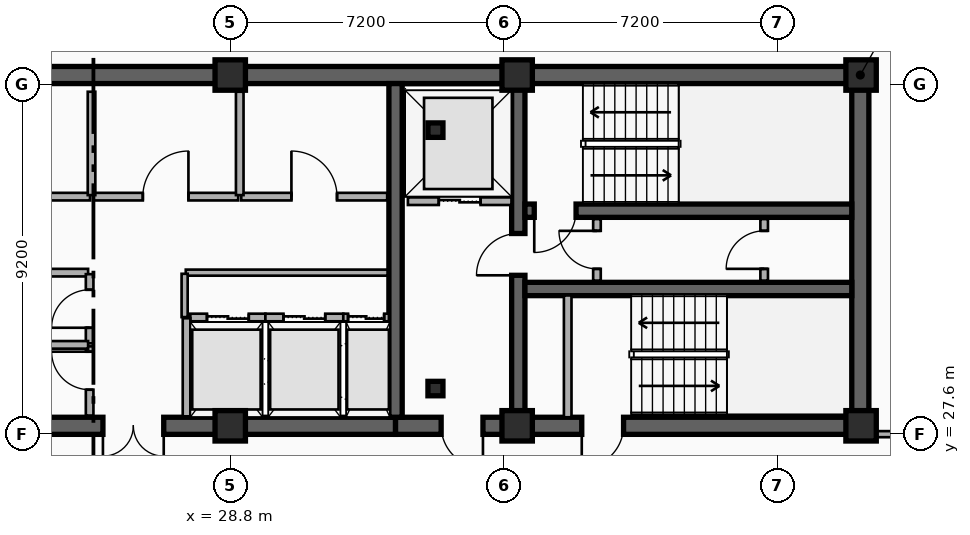
"""IFC4 building model, lengths in metres.
Left out: names, types, materials, properties, quantities, classifications, styles, units other than length and angle.
Written with IfcOpenShell. Run it as: python <this file> out.ifc"""

import sys

from ifc_helpers import new_model, si_unit, direction, frame, frame_2d, origin, origin_2d, place, context, subcontext, project, spatial, rectangle, i_section, extrude, element, fill, save


model = new_model("IFC4")
c1 = context("Model", 3, precision=1e-05, world=origin(), true_north=direction((0.0, 1.0)))
c2 = subcontext(c1, "Body", "Model", "MODEL_VIEW")
j1 = project(units=[si_unit("LENGTHUNIT", "METRE"), si_unit("PLANEANGLEUNIT", "RADIAN")], contexts=[c1])
p1 = place(None, origin())
s1 = spatial("IfcSite", under=j1, at=p1, CompositionType="ELEMENT")
p2 = place(p1, origin())
s2 = spatial("IfcBuilding", under=s1, at=p2, CompositionType="ELEMENT")
p3 = place(p2, frame((0.0, 0.0, 254.7)))
s3 = spatial("IfcBuildingStorey", under=s2, at=p3, CompositionType="ELEMENT", Elevation=254.7)
p4 = place(p3, frame((12.15, 37.05, 0.0), z_axis=(0.0, 0.0, 1.0), x_axis=(1.0, 0.0, 0.0)))
e1 = element("IfcWall", 1, at=p4, inside=s3, PredefinedType="SHEAR", context=c2, shape_type="SweptSolid", body=[
    extrude(rectangle(XDim=33.23, YDim=0.45, at=frame_2d((16.615, 0.0))), origin(), (0.0, 0.0, 1.0), 3.7),
])
p5 = place(p3, frame((33.15, 27.82, 0.0), z_axis=(0.0, 0.0, 1.0), x_axis=(-1.0, 0.0, 0.0)))
e2 = element("IfcWall", 2, at=p5, inside=s3, PredefinedType="SHEAR", context=c2, shape_type="SweptSolid", body=[
    extrude(rectangle(XDim=11.97, YDim=0.45, at=frame_2d((5.985, 0.0))), origin(), (0.0, 0.0, 1.0), 3.7),
])
p6 = place(p5, frame((6.1, 0.0, 0.0)))
e3 = element("IfcOpeningElement", 3, at=p6, cuts=e2, PredefinedType="OPENING", context=c2, shape_type="SweptSolid", body=[
    extrude(rectangle(XDim=1.6, YDim=2.2, at=frame_2d((0.8, 1.1))), frame((0.0, 0.235, 0.0), z_axis=(0.0, -1.0, 0.0), x_axis=(1.0, 0.0, 0.0)), (0.0, 0.0, 1.0), 0.47),
])
p7 = place(p3, frame((45.38, 27.82, 0.0), z_axis=(0.0, 0.0, 1.0), x_axis=(-1.0, 0.0, 0.0)))
e4 = element("IfcWall", 4, at=p7, inside=s3, PredefinedType="SHEAR", context=c2, shape_type="SweptSolid", body=[
    extrude(rectangle(XDim=12.23, YDim=0.45, at=frame_2d((6.115, 0.0))), origin(), (0.0, 0.0, 1.0), 3.7),
])
p8 = place(p7, frame((9.93, 0.0, 0.0)))
e5 = element("IfcOpeningElement", 5, at=p8, cuts=e4, PredefinedType="OPENING", context=c2, shape_type="SweptSolid", body=[
    extrude(rectangle(XDim=1.1, YDim=2.15, at=frame_2d((0.55, 1.075))), frame((0.0, 0.235, 0.0), z_axis=(0.0, -1.0, 0.0), x_axis=(1.0, 0.0, 0.0)), (0.0, 0.0, 1.0), 0.47),
])
p9 = place(p7, frame((6.23, 0.0, 0.0)))
e6 = element("IfcOpeningElement", 6, at=p9, cuts=e4, PredefinedType="OPENING", context=c2, shape_type="SweptSolid", body=[
    extrude(rectangle(XDim=1.1, YDim=2.15, at=frame_2d((0.55, 1.075))), frame((0.0, 0.235, 0.0), z_axis=(0.0, -1.0, 0.0), x_axis=(1.0, 0.0, 0.0)), (0.0, 0.0, 1.0), 0.47),
])
p10 = place(p3, frame((45.38, 28.045, 0.0), z_axis=(0.0, 0.0, 1.0), x_axis=(0.0, 1.0, 0.0)))
e7 = element("IfcWall", 7, at=p10, inside=s3, PredefinedType="SHEAR", context=c2, shape_type="SweptSolid", body=[
    extrude(rectangle(XDim=8.78, YDim=0.45, at=frame_2d((4.39, 0.0))), origin(), (0.0, 0.0, 1.0), 3.7),
])
p11 = place(p3, frame((33.15, 28.045, 0.0), z_axis=(0.0, 0.0, 1.0), x_axis=(0.0, 1.0, 0.0)))
e8 = element("IfcWall", 8, at=p11, inside=s3, PredefinedType="SHEAR", context=c2, shape_type="SweptSolid", body=[
    extrude(rectangle(XDim=8.78, YDim=0.35, at=frame_2d((4.39, 0.0))), origin(), (0.0, 0.0, 1.0), 3.7),
])
p12 = place(p3, frame((36.38, 28.045, 0.0), z_axis=(0.0, 0.0, 1.0), x_axis=(0.0, 1.0, 0.0)))
e9 = element("IfcWall", 9, at=p12, inside=s3, PredefinedType="SHEAR", context=c2, shape_type="SweptSolid", body=[
    extrude(rectangle(XDim=8.78, YDim=0.35, at=frame_2d((4.39, 0.0))), origin(), (0.0, 0.0, 1.0), 3.7),
])
p13 = place(p12, frame((3.735, 0.0, 0.0)))
e10 = element("IfcOpeningElement", 10, at=p13, cuts=e9, PredefinedType="OPENING", context=c2, shape_type="SweptSolid", body=[
    extrude(rectangle(XDim=1.1, YDim=2.15, at=frame_2d((0.55, 1.075))), frame((0.0, 0.185, 0.0), z_axis=(0.0, -1.0, 0.0), x_axis=(1.0, 0.0, 0.0)), (0.0, 0.0, 1.0), 0.37),
])
p14 = place(p3, frame((45.155, 33.48, 0.0), z_axis=(0.0, 0.0, 1.0), x_axis=(-1.0, 0.0, 0.0)))
e11 = element("IfcWall", 11, at=p14, inside=s3, PredefinedType="SHEAR", context=c2, shape_type="SweptSolid", body=[
    extrude(rectangle(XDim=8.6, YDim=0.35, at=frame_2d((4.3, 0.0))), origin(), (0.0, 0.0, 1.0), 3.7),
])
p15 = place(p14, frame((7.255, 0.0, 0.0)))
e12 = element("IfcOpeningElement", 12, at=p15, cuts=e11, PredefinedType="OPENING", context=c2, shape_type="SweptSolid", body=[
    extrude(rectangle(XDim=1.1, YDim=2.15, at=frame_2d((0.55, 1.075))), frame((0.0, 0.185, 0.0), z_axis=(0.0, -1.0, 0.0), x_axis=(1.0, 0.0, 0.0)), (0.0, 0.0, 1.0), 0.37),
])
p16 = place(p3, frame((36.555, 31.42, 0.0), z_axis=(0.0, 0.0, 1.0), x_axis=(1.0, 0.0, 0.0)))
e13 = element("IfcWall", 13, at=p16, inside=s3, PredefinedType="SHEAR", context=c2, shape_type="SweptSolid", body=[
    extrude(rectangle(XDim=8.6, YDim=0.35, at=frame_2d((4.3, 0.0))), origin(), (0.0, 0.0, 1.0), 3.7),
])
for number, where, z_axis, x_axis in (
    (14, (34.2, 28.8, 0.0), (0.0, 0.0, 1.0), (1.0, 0.0, 0.0)),
    (15, (34.2, 35.6, 0.0), (0.0, 0.0, 1.0), (1.0, 0.0, 0.0)),
):
    element("IfcColumn", number, at=place(p3, frame(where, z_axis=z_axis, x_axis=x_axis)), inside=s3, PredefinedType="COLUMN", context=c2, shape_type="SweptSolid", body=[
        extrude(i_section(OverallWidth=0.395, OverallDepth=0.38, WebThickness=0.019, FlangeThickness=0.03, FilletRadius=0.015, at=origin_2d()), origin(), (0.0, 0.0, 1.0), 3.7),
    ])
for number, where, z_axis, x_axis in (
    (16, (28.8, 27.82, 0.0), (0.0, 0.0, 1.0), (1.0, 0.0, 0.0)),
    (17, (28.8, 37.05, 0.0), (0.0, 0.0, 1.0), (1.0, 0.0, 0.0)),
    (18, (36.35, 27.82, 0.0), (0.0, 0.0, 1.0), (1.0, 0.0, 0.0)),
    (19, (36.35, 37.05, 0.0), (0.0, 0.0, 1.0), (1.0, 0.0, 0.0)),
    (20, (45.4, 27.82, 0.0), (0.0, 0.0, 1.0), (1.0, 0.0, 0.0)),
    (21, (45.4, 37.05, 0.0), (0.0, 0.0, 1.0), (1.0, 0.0, 0.0)),
):
    element("IfcColumn", number, at=place(p3, frame(where, z_axis=z_axis, x_axis=x_axis)), inside=s3, PredefinedType="COLUMN", context=c2, shape_type="SweptSolid", body=[
        extrude(rectangle(XDim=0.8, YDim=0.8, at=origin_2d()), origin(), (0.0, 0.0, 1.0), 3.7),
    ])
p17 = place(p3, frame((33.475, 33.73, 0.0), z_axis=(0.0, 0.0, 1.0), x_axis=(1.0, 0.0, 0.0)))
e22 = element("IfcWall", 22, at=p17, inside=s3, PredefinedType="PARTITIONING", context=c2, shape_type="SweptSolid", body=[
    extrude(rectangle(XDim=2.725, YDim=0.2, at=frame_2d((1.362, 0.0))), origin(), (0.0, 0.0, 1.0), 2.49),
])
p18 = place(p17, frame((0.812, 0.0, 0.0)))
e23 = element("IfcOpeningElement", 23, at=p18, cuts=e22, PredefinedType="OPENING", context=c2, shape_type="SweptSolid", body=[
    extrude(rectangle(XDim=1.1, YDim=2.15, at=frame_2d((0.55, 1.075))), frame((0.0, 0.11, 0.0), z_axis=(0.0, -1.0, 0.0), x_axis=(1.0, 0.0, 0.0)), (0.0, 0.0, 1.0), 0.22),
])
p19 = place(p3, frame((27.75, 30.67, 0.0), z_axis=(0.0, 0.0, 1.0), x_axis=(1.0, 0.0, 0.0)))
e24 = element("IfcWall", 24, at=p19, inside=s3, PredefinedType="PARTITIONING", context=c2, shape_type="SweptSolid", body=[
    extrude(rectangle(XDim=1.975, YDim=0.2, at=frame_2d((0.988, 0.0))), origin(), (0.0, 0.0, 1.0), 2.49),
])
p20 = place(p19, frame((0.438, 0.0, 0.0)))
e25 = element("IfcOpeningElement", 25, at=p20, cuts=e24, PredefinedType="OPENING", context=c2, shape_type="SweptSolid", body=[
    extrude(rectangle(XDim=1.1, YDim=2.15, at=frame_2d((0.55, 1.075))), frame((0.0, 0.11, 0.0), z_axis=(0.0, -1.0, 0.0), x_axis=(1.0, 0.0, 0.0)), (0.0, 0.0, 1.0), 0.22),
])
p21 = place(p3, frame((27.65, 28.07, 0.0), z_axis=(0.0, 0.0, 1.0), x_axis=(0.0, 1.0, 0.0)))
e26 = element("IfcWall", 26, at=p21, inside=s3, PredefinedType="PARTITIONING", context=c2, shape_type="SweptSolid", body=[
    extrude(rectangle(XDim=2.58, YDim=0.2, at=frame_2d((1.29, 0.0))), origin(), (0.0, 0.0, 1.0), 2.49),
])
p22 = place(p3, frame((29.725, 30.67, 0.0), z_axis=(0.0, 0.0, 1.0), x_axis=(1.0, 0.0, 0.0)))
e27 = element("IfcWall", 27, at=p22, inside=s3, PredefinedType="PARTITIONING", context=c2, shape_type="SweptSolid", body=[
    extrude(rectangle(XDim=2.05, YDim=0.2, at=frame_2d((1.025, 0.0))), origin(), (0.0, 0.0, 1.0), 2.8),
])
p23 = place(p22, frame((0.475, 0.0, 0.0)))
e28 = element("IfcOpeningElement", 28, at=p23, cuts=e27, PredefinedType="OPENING", context=c2, shape_type="SweptSolid", body=[
    extrude(rectangle(XDim=1.1, YDim=2.15, at=frame_2d((0.55, 1.075))), frame((0.0, 0.11, 0.0), z_axis=(0.0, -1.0, 0.0), x_axis=(1.0, 0.0, 0.0)), (0.0, 0.0, 1.0), 0.22),
])
p24 = place(p3, frame((31.775, 30.67, 0.0), z_axis=(0.0, 0.0, 1.0), x_axis=(1.0, 0.0, 0.0)))
e29 = element("IfcWall", 29, at=p24, inside=s3, PredefinedType="PARTITIONING", context=c2, shape_type="SweptSolid", body=[
    extrude(rectangle(XDim=1.2, YDim=0.2, at=frame_2d((0.6, 0.0))), origin(), (0.0, 0.0, 1.0), 2.8),
])
p25 = place(p24, frame((0.125, 0.0, 0.0)))
e30 = element("IfcOpeningElement", 30, at=p25, cuts=e29, PredefinedType="OPENING", context=c2, shape_type="SweptSolid", body=[
    extrude(rectangle(XDim=0.95, YDim=2.15, at=frame_2d((0.475, 1.075))), frame((0.0, 0.11, 0.0), z_axis=(0.0, -1.0, 0.0), x_axis=(1.0, 0.0, 0.0)), (0.0, 0.0, 1.0), 0.22),
])
p26 = place(p3, frame((37.68, 28.045, 0.0), z_axis=(0.0, 0.0, 1.0), x_axis=(0.0, 1.0, 0.0)))
e31 = element("IfcWall", 31, at=p26, inside=s3, PredefinedType="PARTITIONING", context=c2, shape_type="SweptSolid", body=[
    extrude(rectangle(XDim=3.205, YDim=0.2, at=frame_2d((1.603, 0.0))), origin(), (0.0, 0.0, 1.0), 2.8),
])
p27 = place(p3, frame((38.45, 31.64, 0.0), z_axis=(0.0, 0.0, 1.0), x_axis=(0.0, 1.0, 0.0)))
e32 = element("IfcWall", 32, at=p27, inside=s3, PredefinedType="PARTITIONING", context=c2, shape_type="SweptSolid", body=[
    extrude(rectangle(XDim=1.62, YDim=0.2, at=frame_2d((0.81, 0.0))), origin(), (0.0, 0.0, 1.0), 3.42),
])
p28 = place(p27, frame((0.31, 0.0, 0.0)))
e33 = element("IfcOpeningElement", 33, at=p28, cuts=e32, PredefinedType="OPENING", context=c2, shape_type="SweptSolid", body=[
    extrude(rectangle(XDim=1.0, YDim=2.15, at=frame_2d((0.5, 1.075))), frame((0.0, 0.11, 0.0), z_axis=(0.0, -1.0, 0.0), x_axis=(1.0, 0.0, 0.0)), (0.0, 0.0, 1.0), 0.22),
])
p29 = place(p3, frame((42.85, 31.64, 0.0), z_axis=(0.0, 0.0, 1.0), x_axis=(0.0, 1.0, 0.0)))
e34 = element("IfcWall", 34, at=p29, inside=s3, PredefinedType="PARTITIONING", context=c2, shape_type="SweptSolid", body=[
    extrude(rectangle(XDim=1.62, YDim=0.2, at=frame_2d((0.81, 0.0))), origin(), (0.0, 0.0, 1.0), 3.42),
])
p30 = place(p29, frame((0.31, 0.0, 0.0)))
e35 = element("IfcOpeningElement", 35, at=p30, cuts=e34, PredefinedType="OPENING", context=c2, shape_type="SweptSolid", body=[
    extrude(rectangle(XDim=1.0, YDim=2.15, at=frame_2d((0.5, 1.075))), frame((0.0, 0.11, 0.0), z_axis=(0.0, -1.0, 0.0), x_axis=(1.0, 0.0, 0.0)), (0.0, 0.0, 1.0), 0.22),
])
p31 = place(p3, frame((21.4, 31.85, 0.0), z_axis=(0.0, 0.0, 1.0), x_axis=(1.0, 0.0, 0.0)))
e36 = element("IfcWall", 36, at=p31, inside=s3, PredefinedType="PARTITIONING", context=c2, shape_type="SweptSolid", body=[
    extrude(rectangle(XDim=3.66, YDim=0.2, at=frame_2d((1.83, 0.0))), origin(), (0.0, 0.0, 1.0), 2.49),
])
p32 = place(p31, frame((1.23, 0.0, 0.0)))
e37 = element("IfcOpeningElement", 37, at=p32, cuts=e36, PredefinedType="OPENING", context=c2, shape_type="SweptSolid", body=[
    extrude(rectangle(XDim=1.2, YDim=2.15, at=frame_2d((0.6, 1.075))), frame((0.0, 0.11, 0.0), z_axis=(0.0, -1.0, 0.0), x_axis=(1.0, 0.0, 0.0)), (0.0, 0.0, 1.0), 0.22),
])
p33 = place(p3, frame((21.59, 33.85, 0.0), z_axis=(0.0, 0.0, 1.0), x_axis=(1.0, 0.0, 0.0)))
e38 = element("IfcWall", 38, at=p33, inside=s3, PredefinedType="PARTITIONING", context=c2, shape_type="SweptSolid", body=[
    extrude(rectangle(XDim=3.52, YDim=0.2, at=frame_2d((1.76, 0.0))), origin(), (0.0, 0.0, 1.0), 2.49),
])
p34 = place(p33, frame((0.225, 0.0, 0.0)))
e39 = element("IfcOpeningElement", 39, at=p34, cuts=e38, PredefinedType="OPENING", context=c2, shape_type="SweptSolid", body=[
    extrude(rectangle(XDim=1.2, YDim=2.15, at=frame_2d((0.6, 1.075))), frame((0.0, 0.11, 0.0), z_axis=(0.0, -1.0, 0.0), x_axis=(1.0, 0.0, 0.0)), (0.0, 0.0, 1.0), 0.22),
])
p35 = place(p3, frame((25.19, 33.85, 0.0), z_axis=(0.0, 0.0, 1.0), x_axis=(1.0, 0.0, 0.0)))
e40 = element("IfcWall", 40, at=p35, inside=s3, PredefinedType="PARTITIONING", context=c2, shape_type="SweptSolid", body=[
    extrude(rectangle(XDim=3.82, YDim=0.2, at=frame_2d((1.91, 0.0))), origin(), (0.0, 0.0, 1.0), 2.49),
])
p36 = place(p35, frame((1.31, 0.0, 0.0)))
e41 = element("IfcOpeningElement", 41, at=p36, cuts=e40, PredefinedType="OPENING", context=c2, shape_type="SweptSolid", body=[
    extrude(rectangle(XDim=1.2, YDim=2.15, at=frame_2d((0.6, 1.075))), frame((0.0, 0.11, 0.0), z_axis=(0.0, -1.0, 0.0), x_axis=(1.0, 0.0, 0.0)), (0.0, 0.0, 1.0), 0.22),
])
p37 = place(p3, frame((29.09, 33.85, 0.0), z_axis=(0.0, 0.0, 1.0), x_axis=(1.0, 0.0, 0.0)))
e42 = element("IfcWall", 42, at=p37, inside=s3, PredefinedType="PARTITIONING", context=c2, shape_type="SweptSolid", body=[
    extrude(rectangle(XDim=3.84, YDim=0.2, at=frame_2d((1.92, 0.0))), origin(), (0.0, 0.0, 1.0), 2.49),
])
p38 = place(p37, frame((1.32, 0.0, 0.0)))
e43 = element("IfcOpeningElement", 43, at=p38, cuts=e42, PredefinedType="OPENING", context=c2, shape_type="SweptSolid", body=[
    extrude(rectangle(XDim=1.2, YDim=2.15, at=frame_2d((0.6, 1.075))), frame((0.0, 0.11, 0.0), z_axis=(0.0, -1.0, 0.0), x_axis=(1.0, 0.0, 0.0)), (0.0, 0.0, 1.0), 0.22),
])
p39 = place(p3, frame((25.1, 28.09, 0.0), z_axis=(0.0, 0.0, 1.0), x_axis=(0.0, 1.0, 0.0)))
e44 = element("IfcWall", 44, at=p39, inside=s3, PredefinedType="PARTITIONING", context=c2, shape_type="SweptSolid", body=[
    extrude(rectangle(XDim=1.82, YDim=0.2, at=frame_2d((0.91, 0.0))), origin(), (0.0, 0.0, 1.0), 2.8),
])
p40 = place(p39, frame((0.68, 0.0, 0.0)))
e45 = element("IfcOpeningElement", 45, at=p40, cuts=e44, PredefinedType="OPENING", context=c2, shape_type="SweptSolid", body=[
    extrude(rectangle(XDim=1.0, YDim=2.15, at=frame_2d((0.5, 1.075))), frame((0.0, 0.11, 0.0), z_axis=(0.0, -1.0, 0.0), x_axis=(1.0, 0.0, 0.0)), (0.0, 0.0, 1.0), 0.22),
])
p41 = place(p3, frame((25.1, 29.99, 0.0), z_axis=(0.0, 0.0, 1.0), x_axis=(0.0, 1.0, 0.0)))
e46 = element("IfcWall", 46, at=p41, inside=s3, PredefinedType="PARTITIONING", context=c2, shape_type="SweptSolid", body=[
    extrude(rectangle(XDim=1.82, YDim=0.2, at=frame_2d((0.91, 0.0))), origin(), (0.0, 0.0, 1.0), 3.42),
])
p42 = place(p41, frame((0.41, 0.0, 0.0)))
e47 = element("IfcOpeningElement", 47, at=p42, cuts=e46, PredefinedType="OPENING", context=c2, shape_type="SweptSolid", body=[
    extrude(rectangle(XDim=1.0, YDim=2.15, at=frame_2d((0.5, 1.075))), frame((0.0, 0.11, 0.0), z_axis=(0.0, -1.0, 0.0), x_axis=(1.0, 0.0, 0.0)), (0.0, 0.0, 1.0), 0.22),
])
p43 = place(p3, frame((21.4, 29.95, 0.0), z_axis=(0.0, 0.0, 1.0), x_axis=(1.0, 0.0, 0.0)))
e48 = element("IfcWall", 48, at=p43, inside=s3, PredefinedType="PARTITIONING", context=c2, shape_type="SweptSolid", body=[
    extrude(rectangle(XDim=3.66, YDim=0.2, at=frame_2d((1.83, 0.0))), origin(), (0.0, 0.0, 1.0), 2.49),
])
p44 = place(p3, frame((25.15, 33.89, 0.0), z_axis=(0.0, 0.0, 1.0), x_axis=(0.0, 1.0, 0.0)))
e49 = element("IfcWall", 49, at=p44, inside=s3, PredefinedType="PARTITIONING", context=c2, shape_type="SweptSolid", body=[
    extrude(rectangle(XDim=2.72, YDim=0.2, at=frame_2d((1.36, 0.0))), origin(), (0.0, 0.0, 1.0), 3.42),
])
p45 = place(p3, frame((29.05, 33.89, 0.0), z_axis=(0.0, 0.0, 1.0), x_axis=(0.0, 1.0, 0.0)))
e50 = element("IfcWall", 50, at=p45, inside=s3, PredefinedType="PARTITIONING", context=c2, shape_type="SweptSolid", body=[
    extrude(rectangle(XDim=2.72, YDim=0.2, at=frame_2d((1.36, 0.0))), origin(), (0.0, 0.0, 1.0), 2.49),
])
p46 = place(p3, frame((27.63, 31.85, 0.0), z_axis=(0.0, 0.0, 1.0), x_axis=(1.0, 0.0, 0.0)))
e51 = element("IfcWall", 51, at=p46, inside=s3, PredefinedType="PARTITIONING", context=c2, shape_type="SweptSolid", body=[
    extrude(rectangle(XDim=5.31, YDim=0.16, at=frame_2d((2.655, 0.0))), origin(), (0.0, 0.0, 1.0), 2.49),
])
p47 = place(p3, frame((27.6, 30.68, 0.0), z_axis=(0.0, 0.0, 1.0), x_axis=(0.0, 1.0, 0.0)))
e52 = element("IfcWall", 52, at=p47, inside=s3, PredefinedType="PARTITIONING", context=c2, shape_type="SweptSolid", body=[
    extrude(rectangle(XDim=1.14, YDim=0.16, at=frame_2d((0.57, 0.0))), origin(), (0.0, 0.0, 1.0), 3.42),
])
p48 = place(p3, frame((45.41, 27.6, 0.0), z_axis=(0.0, 0.0, 1.0), x_axis=(1.0, 0.0, 0.0)))
e53 = element("IfcWall", 53, at=p48, inside=s3, PredefinedType="PARTITIONING", context=c2, shape_type="SweptSolid", body=[
    extrude(rectangle(XDim=0.91, YDim=0.16, at=frame_2d((0.455, 0.0))), origin(), (0.0, 0.0, 1.0), 2.49),
])
p49 = place(p18, origin())
e54 = element("IfcDoor", 54, at=p49, inside=s3, OperationType="DOUBLE_DOOR_SLIDING", PredefinedType="DOOR", context=c2, shape_type="SweptSolid", body=[
    extrude(rectangle(XDim=1.1, YDim=2.15, at=frame_2d((0.55, 1.075))), frame((0.0, 0.025, 0.0), z_axis=(0.0, -1.0, 0.0), x_axis=(1.0, 0.0, 0.0)), (0.0, 0.0, 1.0), 0.05),
])
fill(e23, e54)
p50 = place(p20, origin())
e55 = element("IfcDoor", 55, at=p50, inside=s3, OperationType="DOUBLE_DOOR_SLIDING", PredefinedType="DOOR", context=c2, shape_type="SweptSolid", body=[
    extrude(rectangle(XDim=1.1, YDim=2.15, at=frame_2d((0.55, 1.075))), frame((0.0, 0.025, 0.0), z_axis=(0.0, -1.0, 0.0), x_axis=(1.0, 0.0, 0.0)), (0.0, 0.0, 1.0), 0.05),
])
fill(e25, e55)
p51 = place(p23, origin())
e56 = element("IfcDoor", 56, at=p51, inside=s3, OperationType="DOUBLE_DOOR_SLIDING", PredefinedType="DOOR", context=c2, shape_type="SweptSolid", body=[
    extrude(rectangle(XDim=1.1, YDim=2.15, at=frame_2d((0.55, 1.075))), frame((0.0, 0.025, 0.0), z_axis=(0.0, -1.0, 0.0), x_axis=(1.0, 0.0, 0.0)), (0.0, 0.0, 1.0), 0.05),
])
fill(e28, e56)
p52 = place(p25, origin())
e57 = element("IfcDoor", 57, at=p52, inside=s3, OperationType="DOUBLE_DOOR_SLIDING", PredefinedType="DOOR", context=c2, shape_type="SweptSolid", body=[
    extrude(rectangle(XDim=0.95, YDim=2.15, at=frame_2d((0.475, 1.075))), frame((0.0, 0.025, 0.0), z_axis=(0.0, -1.0, 0.0), x_axis=(1.0, 0.0, 0.0)), (0.0, 0.0, 1.0), 0.05),
])
fill(e30, e57)
p53 = place(p15, origin())
e58 = element("IfcDoor", 58, at=p53, inside=s3, OperationType="SINGLE_SWING_RIGHT", PredefinedType="DOOR", context=c2, shape_type="SweptSolid", body=[
    extrude(rectangle(XDim=1.1, YDim=2.15, at=frame_2d((0.55, 1.075))), frame((0.0, 0.025, 0.0), z_axis=(0.0, -1.0, 0.0), x_axis=(1.0, 0.0, 0.0)), (0.0, 0.0, 1.0), 0.05),
])
fill(e12, e58)
p54 = place(p13, origin())
e59 = element("IfcDoor", 59, at=p54, inside=s3, OperationType="SINGLE_SWING_LEFT", PredefinedType="DOOR", context=c2, shape_type="SweptSolid", body=[
    extrude(rectangle(XDim=1.1, YDim=2.15, at=frame_2d((0.55, 1.075))), frame((0.0, 0.025, 0.0), z_axis=(0.0, -1.0, 0.0), x_axis=(1.0, 0.0, 0.0)), (0.0, 0.0, 1.0), 0.05),
])
fill(e10, e59)
p55 = place(p8, origin())
e60 = element("IfcDoor", 60, at=p55, inside=s3, OperationType="SINGLE_SWING_LEFT", PredefinedType="DOOR", context=c2, shape_type="SweptSolid", body=[
    extrude(rectangle(XDim=1.1, YDim=2.15, at=frame_2d((0.55, 1.075))), frame((0.0, 0.025, 0.0), z_axis=(0.0, -1.0, 0.0), x_axis=(1.0, 0.0, 0.0)), (0.0, 0.0, 1.0), 0.05),
])
fill(e5, e60)
p56 = place(p9, origin())
e61 = element("IfcDoor", 61, at=p56, inside=s3, OperationType="SINGLE_SWING_RIGHT", PredefinedType="DOOR", context=c2, shape_type="SweptSolid", body=[
    extrude(rectangle(XDim=1.1, YDim=2.15, at=frame_2d((0.55, 1.075))), frame((0.0, 0.025, 0.0), z_axis=(0.0, -1.0, 0.0), x_axis=(1.0, 0.0, 0.0)), (0.0, 0.0, 1.0), 0.05),
])
fill(e6, e61)
p57 = place(p6, origin())
e62 = element("IfcDoor", 62, at=p57, inside=s3, OperationType="SINGLE_SWING_LEFT", PredefinedType="DOOR", context=c2, shape_type="SweptSolid", body=[
    extrude(rectangle(XDim=1.6, YDim=2.2, at=frame_2d((0.8, 1.1))), frame((0.0, 0.025, 0.0), z_axis=(0.0, -1.0, 0.0), x_axis=(1.0, 0.0, 0.0)), (0.0, 0.0, 1.0), 0.05),
])
fill(e3, e62)
p58 = place(p28, origin())
e63 = element("IfcDoor", 63, at=p58, inside=s3, OperationType="SINGLE_SWING_RIGHT", PredefinedType="DOOR", context=c2, shape_type="SweptSolid", body=[
    extrude(rectangle(XDim=1.0, YDim=2.15, at=frame_2d((0.5, 1.075))), frame((0.0, 0.025, 0.0), z_axis=(0.0, -1.0, 0.0), x_axis=(1.0, 0.0, 0.0)), (0.0, 0.0, 1.0), 0.05),
])
fill(e33, e63)
p59 = place(p30, origin())
e64 = element("IfcDoor", 64, at=p59, inside=s3, OperationType="SINGLE_SWING_LEFT", PredefinedType="DOOR", context=c2, shape_type="SweptSolid", body=[
    extrude(rectangle(XDim=1.0, YDim=2.15, at=frame_2d((0.5, 1.075))), frame((0.0, 0.025, 0.0), z_axis=(0.0, -1.0, 0.0), x_axis=(1.0, 0.0, 0.0)), (0.0, 0.0, 1.0), 0.05),
])
fill(e35, e64)
p60 = place(p36, origin())
e65 = element("IfcDoor", 65, at=p60, inside=s3, OperationType="SINGLE_SWING_RIGHT", PredefinedType="DOOR", context=c2, shape_type="SweptSolid", body=[
    extrude(rectangle(XDim=1.2, YDim=2.15, at=frame_2d((0.6, 1.075))), frame((0.0, 0.025, 0.0), z_axis=(0.0, -1.0, 0.0), x_axis=(1.0, 0.0, 0.0)), (0.0, 0.0, 1.0), 0.05),
])
fill(e41, e65)
p61 = place(p38, origin())
e66 = element("IfcDoor", 66, at=p61, inside=s3, OperationType="SINGLE_SWING_LEFT", PredefinedType="DOOR", context=c2, shape_type="SweptSolid", body=[
    extrude(rectangle(XDim=1.2, YDim=2.15, at=frame_2d((0.6, 1.075))), frame((0.0, 0.025, 0.0), z_axis=(0.0, -1.0, 0.0), x_axis=(1.0, 0.0, 0.0)), (0.0, 0.0, 1.0), 0.05),
])
fill(e43, e66)
p62 = place(p40, origin())
e67 = element("IfcDoor", 67, at=p62, inside=s3, OperationType="SINGLE_SWING_RIGHT", PredefinedType="DOOR", context=c2, shape_type="SweptSolid", body=[
    extrude(rectangle(XDim=1.0, YDim=2.15, at=frame_2d((0.5, 1.075))), frame((0.0, 0.025, 0.0), z_axis=(0.0, -1.0, 0.0), x_axis=(1.0, 0.0, 0.0)), (0.0, 0.0, 1.0), 0.05),
])
fill(e45, e67)
p63 = place(p42, origin())
e68 = element("IfcDoor", 68, at=p63, inside=s3, OperationType="SINGLE_SWING_LEFT", PredefinedType="DOOR", context=c2, shape_type="SweptSolid", body=[
    extrude(rectangle(XDim=1.0, YDim=2.15, at=frame_2d((0.5, 1.075))), frame((0.0, 0.025, 0.0), z_axis=(0.0, -1.0, 0.0), x_axis=(1.0, 0.0, 0.0)), (0.0, 0.0, 1.0), 0.05),
])
fill(e47, e68)
save(model, sys.argv[1])
